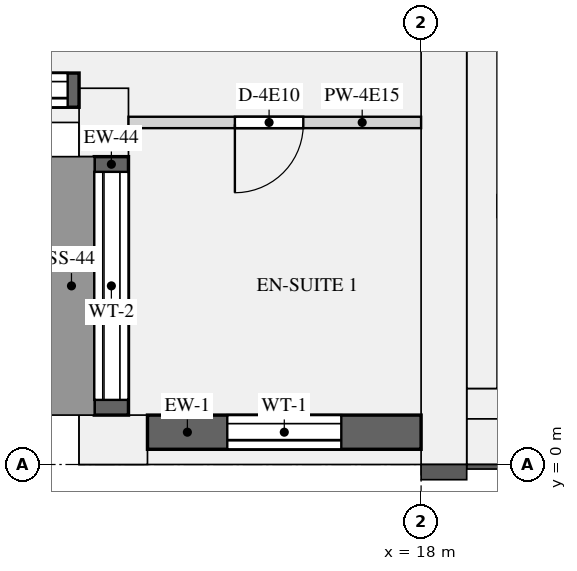
"""IFC4 building model, lengths in metres.
Left out: names, types, materials, properties, quantities, classifications, styles, units other than length and angle.
Written with IfcOpenShell. Run it as: python <this file> out.ifc"""

import sys

from ifc_helpers import new_model, si_unit, direction, frame, frame_2d, origin, origin_2d, place, context, subcontext, project, spatial, rectangle, extrude, element, fill, save


model = new_model("IFC4")
c1 = context("Model", 3, precision=1e-05, world=origin(), true_north=direction((0.0, 1.0)))
c2 = subcontext(c1, "Body", "Model", "MODEL_VIEW")
j1 = project(units=[si_unit("LENGTHUNIT", "METRE"), si_unit("PLANEANGLEUNIT", "RADIAN")], contexts=[c1])
p1 = place(None, origin())
s1 = spatial("IfcSite", under=j1, at=p1, CompositionType="ELEMENT")
p2 = place(p1, origin())
s2 = spatial("IfcBuilding", under=s1, at=p2, CompositionType="ELEMENT")
p3 = place(p2, frame((0.0, 0.0, 229.5)))
s3 = spatial("IfcBuildingStorey", under=s2, at=p3, CompositionType="ELEMENT", Elevation=229.5)
for number, where, z_axis, x_axis in (
    (1, (13.95, 0.325, 0.0), (0.0, 0.0, 1.0), (1.0, 0.0, 0.0)),
    (2, (13.825, 4.5, 0.0), (0.0, 0.0, 1.0), (0.0, -1.0, 0.0)),
):
    element("IfcColumn", number, at=place(p3, frame(where, z_axis=z_axis, x_axis=x_axis)), inside=s3, PredefinedType="USERDEFINED", context=c2, shape_type="SweptSolid", body=[
        extrude(rectangle(XDim=0.9, YDim=0.65, at=origin_2d()), origin(), (0.0, 0.0, 1.0), 3.15),
    ])
p4 = place(p3, frame((18.3, 0.0, 0.0), z_axis=(0.0, 0.0, 1.0), x_axis=(0.0, 1.0, 0.0)))
e3 = element("IfcWall", 3, at=p4, inside=s3, PredefinedType="SHEAR", context=c2, shape_type="SweptSolid", body=[
    extrude(rectangle(XDim=12.5, YDim=0.6, at=frame_2d((6.25, 0.0))), origin(), (0.0, 0.0, 1.0), 3.15),
])
p5 = place(p3, frame((18.6, 0.3, 0.0), z_axis=(0.0, 0.0, 1.0), x_axis=(1.0, 0.0, 0.0)))
e4 = element("IfcWall", 4, at=p5, inside=s3, PredefinedType="SHEAR", context=c2, shape_type="SweptSolid", body=[
    extrude(rectangle(XDim=34.8, YDim=0.6, at=frame_2d((17.4, 0.0))), origin(), (0.0, 0.0, 1.0), 3.15),
])
p6 = place(p3, frame((18.8, 1.0, 0.0), z_axis=(0.0, 0.0, 1.0), x_axis=(0.0, 1.0, 0.0)))
e5 = element("IfcWall", 5, at=p6, inside=s3, PredefinedType="SHEAR", context=c2, shape_type="SweptSolid", body=[
    extrude(rectangle(XDim=10.9, YDim=0.4, at=frame_2d((5.45, 0.0))), origin(), (0.0, 0.0, 1.0), 3.15),
])
p7 = place(p3, frame((18.6, 0.8, 0.0), z_axis=(0.0, 0.0, 1.0), x_axis=(1.0, 0.0, 0.0)))
e6 = element("IfcWall", 6, at=p7, inside=s3, PredefinedType="SHEAR", context=c2, shape_type="SweptSolid", body=[
    extrude(rectangle(XDim=34.8, YDim=0.4, at=frame_2d((17.4, 0.0))), origin(), (0.0, 0.0, 1.0), 3.15),
])
p8 = place(p3, frame((19.0, 3.4, 0.0), z_axis=(0.0, 0.0, 1.0), x_axis=(1.0, 0.0, 0.0)))
e7 = element("IfcWall", 7, at=p8, inside=s3, PredefinedType="SHEAR", context=c2, shape_type="SweptSolid", body=[
    extrude(rectangle(XDim=2.55, YDim=0.3, at=frame_2d((1.275, 0.0))), origin(), (0.0, 0.0, 1.0), 3.15),
])
p9 = place(p8, frame((0.675, 0.0, 0.0)))
e8 = element("IfcOpeningElement", 8, at=p9, cuts=e7, PredefinedType="OPENING", context=c2, shape_type="SweptSolid", body=[
    extrude(rectangle(XDim=1.2, YDim=2.1, at=frame_2d((0.6, 1.05))), frame((0.0, 0.16, 0.0), z_axis=(0.0, -1.0, 0.0), x_axis=(1.0, 0.0, 0.0)), (0.0, 0.0, 1.0), 0.32),
])
p10 = place(p3, frame((14.4, 0.425, 0.9), z_axis=(0.0, 0.0, 1.0), x_axis=(1.0, 0.0, 0.0)))
e9 = element("IfcWall", 9, at=p10, inside=s3, PredefinedType="SOLIDWALL", context=c2, shape_type="SweptSolid", body=[
    extrude(rectangle(XDim=3.6, YDim=0.45, at=frame_2d((1.8, 0.0))), origin(), (0.0, 0.0, 1.0), 1.93),
])
p11 = place(p10, frame((1.05, 0.0, 0.15)))
e10 = element("IfcOpeningElement", 10, at=p11, cuts=e9, PredefinedType="OPENING", context=c2, shape_type="SweptSolid", body=[
    extrude(rectangle(XDim=1.5, YDim=1.5, at=frame_2d((0.75, 0.75))), frame((0.0, 0.235, 0.0), z_axis=(0.0, -1.0, 0.0), x_axis=(1.0, 0.0, 0.0)), (0.0, 0.0, 1.0), 0.47),
])
p12 = place(p3, frame((9.9, 4.925, 0.9), z_axis=(0.0, 0.0, 1.0), x_axis=(1.0, 0.0, 0.0)))
e11 = element("IfcWall", 11, at=p12, inside=s3, PredefinedType="SOLIDWALL", context=c2, shape_type="SweptSolid", body=[
    extrude(rectangle(XDim=3.6, YDim=0.45, at=frame_2d((1.8, 0.0))), origin(), (0.0, 0.0, 1.0), 1.93),
])
p13 = place(p12, frame((0.15, 0.0, 0.15)))
e12 = element("IfcOpeningElement", 12, at=p13, cuts=e11, PredefinedType="OPENING", context=c2, shape_type="SweptSolid", body=[
    extrude(rectangle(XDim=3.3, YDim=1.5, at=frame_2d((1.65, 0.75))), frame((0.0, 0.235, 0.0), z_axis=(0.0, -1.0, 0.0), x_axis=(1.0, 0.0, 0.0)), (0.0, 0.0, 1.0), 0.47),
])
p14 = place(p3, frame((13.925, 4.05, 0.9), z_axis=(0.0, 0.0, 1.0), x_axis=(0.0, -1.0, 0.0)))
e13 = element("IfcWall", 13, at=p14, inside=s3, PredefinedType="SOLIDWALL", context=c2, shape_type="SweptSolid", body=[
    extrude(rectangle(XDim=3.4, YDim=0.45, at=frame_2d((1.7, 0.0))), origin(), (0.0, 0.0, 1.0), 1.93),
])
p15 = place(p14, frame((0.2, 0.0, 0.15)))
e14 = element("IfcOpeningElement", 14, at=p15, cuts=e13, PredefinedType="OPENING", context=c2, shape_type="SweptSolid", body=[
    extrude(rectangle(XDim=3.0, YDim=1.5, at=frame_2d((1.5, 0.75))), frame((0.0, 0.235, 0.0), z_axis=(0.0, -1.0, 0.0), x_axis=(1.0, 0.0, 0.0)), (0.0, 0.0, 1.0), 0.47),
])
p16 = place(p3, frame((14.15, 4.5, 0.0), z_axis=(0.0, 0.0, 1.0), x_axis=(1.0, 0.0, 0.0)))
e15 = element("IfcWall", 15, at=p16, inside=s3, PredefinedType="PARTITIONING", context=c2, shape_type="SweptSolid", body=[
    extrude(rectangle(XDim=3.85, YDim=0.15, at=frame_2d((1.925, 0.0))), origin(), (0.0, 0.0, 1.0), 2.83),
])
p17 = place(p16, frame((1.4, 0.0, 0.0)))
e16 = element("IfcOpeningElement", 16, at=p17, cuts=e15, PredefinedType="OPENING", context=c2, shape_type="SweptSolid", body=[
    extrude(rectangle(XDim=0.9, YDim=2.1, at=frame_2d((0.45, 1.05))), frame((0.0, 0.085, 0.0), z_axis=(0.0, -1.0, 0.0), x_axis=(1.0, 0.0, 0.0)), (0.0, 0.0, 1.0), 0.17),
])
p18 = place(p11, origin())
e17 = element("IfcWindow", 17, at=p18, inside=s3, PartitioningType="SINGLE_PANEL", PredefinedType="WINDOW", context=c2, shape_type="SweptSolid", body=[
    extrude(rectangle(XDim=1.5, YDim=1.5, at=frame_2d((0.75, 0.75))), frame((0.0, -0.065, 0.0), z_axis=(0.0, -1.0, 0.0), x_axis=(1.0, 0.0, 0.0)), (0.0, 0.0, 1.0), 0.06),
])
fill(e10, e17)
p19 = place(p13, origin())
e18 = element("IfcWindow", 18, at=p19, inside=s3, PartitioningType="SINGLE_PANEL", PredefinedType="WINDOW", context=c2, shape_type="SweptSolid", body=[
    extrude(rectangle(XDim=3.3, YDim=1.5, at=frame_2d((1.65, 0.75))), frame((0.0, -0.065, 0.0), z_axis=(0.0, -1.0, 0.0), x_axis=(1.0, 0.0, 0.0)), (0.0, 0.0, 1.0), 0.06),
])
fill(e12, e18)
p20 = place(p15, origin())
e19 = element("IfcWindow", 19, at=p20, inside=s3, PartitioningType="SINGLE_PANEL", PredefinedType="WINDOW", context=c2, shape_type="SweptSolid", body=[
    extrude(rectangle(XDim=3.0, YDim=1.5, at=frame_2d((1.5, 0.75))), frame((0.0, -0.065, 0.0), z_axis=(0.0, -1.0, 0.0), x_axis=(1.0, 0.0, 0.0)), (0.0, 0.0, 1.0), 0.06),
])
fill(e14, e19)
p21 = place(p17, frame((0.9, 0.0, 0.0), z_axis=(0.0, 0.0, 1.0), x_axis=(-1.0, 0.0, 0.0)))
e20 = element("IfcDoor", 20, at=p21, inside=s3, OperationType="SINGLE_SWING_RIGHT", PredefinedType="DOOR", context=c2, shape_type="SweptSolid", body=[
    extrude(rectangle(XDim=0.9, YDim=2.1, at=frame_2d((0.45, 1.05))), frame((0.0, 0.025, 0.0), z_axis=(0.0, -1.0, 0.0), x_axis=(1.0, 0.0, 0.0)), (0.0, 0.0, 1.0), 0.05),
])
fill(e16, e20)
save(model, sys.argv[1])
